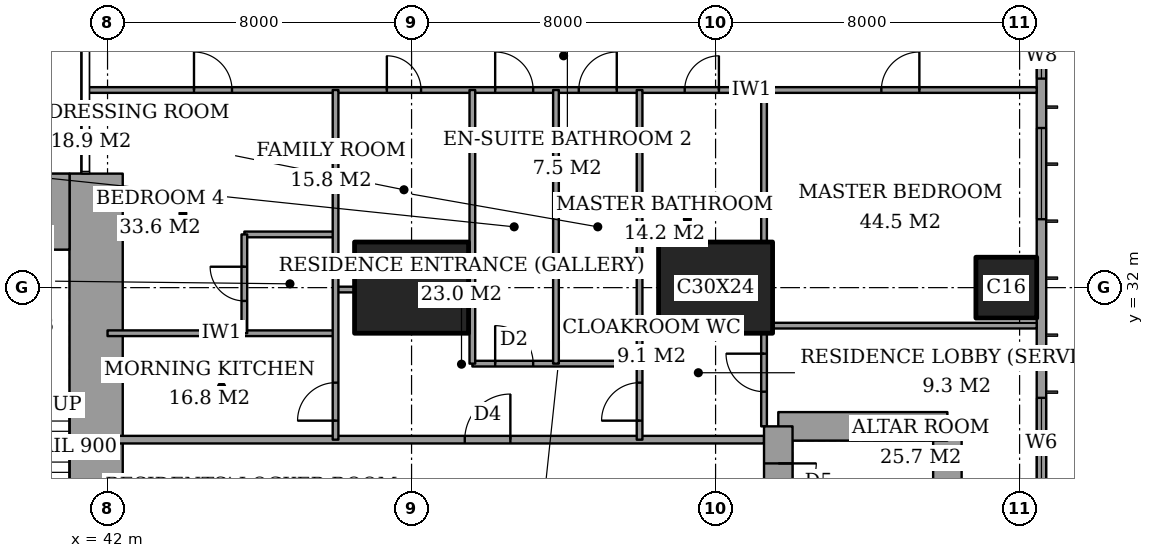
"""IFC4 building model, lengths in metres.
Left out: names, types, materials, properties, quantities, classifications, styles, units other than length and angle.
Written with IfcOpenShell. Run it as: python <this file> out.ifc"""

import sys

from ifc_helpers import new_model, si_unit, direction, frame, frame_2d, origin, origin_2d, place, context, subcontext, project, spatial, rectangle, extrude, element, fill, save


model = new_model("IFC4")
c1 = context("Model", 3, precision=1e-05, world=origin(), true_north=direction((0.0, 1.0)))
c2 = subcontext(c1, "Body", "Model", "MODEL_VIEW")
j1 = project(units=[si_unit("LENGTHUNIT", "METRE"), si_unit("PLANEANGLEUNIT", "RADIAN")], contexts=[c1])
p1 = place(None, origin())
s1 = spatial("IfcSite", under=j1, at=p1, CompositionType="ELEMENT")
p2 = place(p1, origin())
s2 = spatial("IfcBuilding", under=s1, at=p2, CompositionType="ELEMENT")
p3 = place(p2, frame((0.0, 0.0, 241.2)))
s3 = spatial("IfcBuildingStorey", under=s2, at=p3, CompositionType="ELEMENT", Elevation=241.2)
for number, where, z_axis, x_axis in (
    (1, (50.0, 32.0, 0.0), (0.0, 0.0, 1.0), (1.0, 0.0, 0.0)),
    (2, (58.0, 32.0, 0.0), (0.0, 0.0, 1.0), (1.0, 0.0, 0.0)),
):
    element("IfcColumn", number, at=place(p3, frame(where, z_axis=z_axis, x_axis=x_axis)), inside=s3, PredefinedType="COLUMN", context=c2, shape_type="SweptSolid", body=[
        extrude(rectangle(XDim=3.0, YDim=2.4, at=origin_2d()), origin(), (0.0, 0.0, 1.0), 3.6),
    ])
p4 = place(p3, frame((65.65, 32.0, 0.0), z_axis=(0.0, 0.0, 1.0), x_axis=(1.0, 0.0, 0.0)))
e3 = element("IfcColumn", 3, at=p4, inside=s3, PredefinedType="COLUMN", context=c2, shape_type="SweptSolid", body=[
    extrude(rectangle(XDim=1.6, YDim=1.6, at=origin_2d()), origin(), (0.0, 0.0, 1.0), 3.6),
])
p5 = place(p3, frame((37.85, 34.0, 0.0), z_axis=(0.0, 0.0, 1.0), x_axis=(1.0, 0.0, 0.0)))
e4 = element("IfcWall", 4, at=p5, inside=s3, PredefinedType="SHEAR", context=c2, shape_type="SweptSolid", body=[
    extrude(rectangle(XDim=3.15, YDim=2.0, at=frame_2d((1.575, 0.0))), origin(), (0.0, 0.0, 1.0), 3.6),
])
p6 = place(p3, frame((41.7, 24.85, 0.0), z_axis=(0.0, 0.0, 1.0), x_axis=(0.0, 1.0, 0.0)))
e5 = element("IfcWall", 5, at=p6, inside=s3, PredefinedType="SHEAR", context=c2, shape_type="SweptSolid", body=[
    extrude(rectangle(XDim=10.15, YDim=1.4, at=frame_2d((5.075, 0.0))), origin(), (0.0, 0.0, 1.0), 3.6),
])
p7 = place(p3, frame((64.1, 19.65, 0.0), z_axis=(0.0, 0.0, 1.0), x_axis=(0.0, 1.0, 0.0)))
e6 = element("IfcWall", 6, at=p7, inside=s3, PredefinedType="SHEAR", context=c2, shape_type="SweptSolid", body=[
    extrude(rectangle(XDim=8.7, YDim=0.75, at=frame_2d((4.35, 0.0))), origin(), (0.0, 0.0, 1.0), 3.6),
])
p8 = place(p3, frame((64.1, 28.35, 0.0), z_axis=(0.0, 0.0, 1.0), x_axis=(-1.0, 0.0, 0.0)))
e7 = element("IfcWall", 7, at=p8, inside=s3, PredefinedType="SHEAR", context=c2, shape_type="SweptSolid", body=[
    extrude(rectangle(XDim=4.45, YDim=0.75, at=frame_2d((2.225, 0.0))), origin(), (0.0, 0.0, 1.0), 3.6),
])
p9 = place(p3, frame((59.65, 28.35, 0.0), z_axis=(0.0, 0.0, 1.0), x_axis=(0.0, -1.0, 0.0)))
e8 = element("IfcWall", 8, at=p9, inside=s3, PredefinedType="SHEAR", context=c2, shape_type="SweptSolid", body=[
    extrude(rectangle(XDim=8.7, YDim=0.75, at=frame_2d((4.35, 0.0))), origin(), (0.0, 0.0, 1.0), 3.6),
])
p10 = place(p9, frame((0.975, 0.0, 0.0)))
e9 = element("IfcOpeningElement", 9, at=p10, cuts=e8, PredefinedType="OPENING", context=c2, shape_type="SweptSolid", body=[
    extrude(rectangle(XDim=1.0, YDim=2.1, at=frame_2d((0.5, 1.05))), frame((0.0, 0.385, 0.0), z_axis=(0.0, -1.0, 0.0), x_axis=(1.0, 0.0, 0.0)), (0.0, 0.0, 1.0), 0.77),
])
p11 = place(p3, frame((66.575, 3.175, 0.0), z_axis=(0.0, 0.0, 1.0), x_axis=(0.0, 1.0, 0.0)))
e10 = element("IfcWall", 10, at=p11, inside=s3, PredefinedType="SOLIDWALL", context=c2, shape_type="SweptSolid", body=[
    extrude(rectangle(XDim=41.65, YDim=0.25, at=frame_2d((20.825, 0.0))), origin(), (0.0, 0.0, 1.0), 3.6),
])
p12 = place(p11, frame((0.875, 0.0, 0.6)))
e11 = element("IfcOpeningElement", 11, at=p12, cuts=e10, PredefinedType="OPENING", context=c2, shape_type="SweptSolid", body=[
    extrude(rectangle(XDim=2.4, YDim=2.0, at=frame_2d((1.2, 1.0))), frame((0.0, 0.135, 0.0), z_axis=(0.0, -1.0, 0.0), x_axis=(1.0, 0.0, 0.0)), (0.0, 0.0, 1.0), 0.27),
])
p13 = place(p11, frame((6.0, 0.0, 0.6)))
e12 = element("IfcOpeningElement", 12, at=p13, cuts=e10, PredefinedType="OPENING", context=c2, shape_type="SweptSolid", body=[
    extrude(rectangle(XDim=1.2, YDim=2.0, at=frame_2d((0.6, 1.0))), frame((0.0, 0.135, 0.0), z_axis=(0.0, -1.0, 0.0), x_axis=(1.0, 0.0, 0.0)), (0.0, 0.0, 1.0), 0.27),
])
p14 = place(p11, frame((8.525, 0.0, 0.6)))
e13 = element("IfcOpeningElement", 13, at=p14, cuts=e10, PredefinedType="OPENING", context=c2, shape_type="SweptSolid", body=[
    extrude(rectangle(XDim=2.4, YDim=2.0, at=frame_2d((1.2, 1.0))), frame((0.0, 0.135, 0.0), z_axis=(0.0, -1.0, 0.0), x_axis=(1.0, 0.0, 0.0)), (0.0, 0.0, 1.0), 0.27),
])
p15 = place(p11, frame((15.725, 0.0, 0.6)))
e14 = element("IfcOpeningElement", 14, at=p15, cuts=e10, PredefinedType="OPENING", context=c2, shape_type="SweptSolid", body=[
    extrude(rectangle(XDim=2.4, YDim=2.0, at=frame_2d((1.2, 1.0))), frame((0.0, 0.135, 0.0), z_axis=(0.0, -1.0, 0.0), x_axis=(1.0, 0.0, 0.0)), (0.0, 0.0, 1.0), 0.27),
])
p16 = place(p11, frame((23.525, 0.0, 0.6)))
e15 = element("IfcOpeningElement", 15, at=p16, cuts=e10, PredefinedType="OPENING", context=c2, shape_type="SweptSolid", body=[
    extrude(rectangle(XDim=2.4, YDim=2.0, at=frame_2d((1.2, 1.0))), frame((0.0, 0.135, 0.0), z_axis=(0.0, -1.0, 0.0), x_axis=(1.0, 0.0, 0.0)), (0.0, 0.0, 1.0), 0.27),
])
p17 = place(p11, frame((30.625, 0.0, 0.6)))
e16 = element("IfcOpeningElement", 16, at=p17, cuts=e10, PredefinedType="OPENING", context=c2, shape_type="SweptSolid", body=[
    extrude(rectangle(XDim=2.4, YDim=2.0, at=frame_2d((1.2, 1.0))), frame((0.0, 0.135, 0.0), z_axis=(0.0, -1.0, 0.0), x_axis=(1.0, 0.0, 0.0)), (0.0, 0.0, 1.0), 0.27),
])
p18 = place(p11, frame((34.325, 0.0, 0.6)))
e17 = element("IfcOpeningElement", 17, at=p18, cuts=e10, PredefinedType="OPENING", context=c2, shape_type="SweptSolid", body=[
    extrude(rectangle(XDim=1.2, YDim=2.0, at=frame_2d((0.6, 1.0))), frame((0.0, 0.135, 0.0), z_axis=(0.0, -1.0, 0.0), x_axis=(1.0, 0.0, 0.0)), (0.0, 0.0, 1.0), 0.27),
])
p19 = place(p11, frame((38.375, 0.0, 0.6)))
e18 = element("IfcOpeningElement", 18, at=p19, cuts=e10, PredefinedType="OPENING", context=c2, shape_type="SweptSolid", body=[
    extrude(rectangle(XDim=2.4, YDim=2.0, at=frame_2d((1.2, 1.0))), frame((0.0, 0.135, 0.0), z_axis=(0.0, -1.0, 0.0), x_axis=(1.0, 0.0, 0.0)), (0.0, 0.0, 1.0), 0.27),
])
p20 = place(p3, frame((42.0, 28.0, 0.0), z_axis=(0.0, 0.0, 1.0), x_axis=(1.0, 0.0, 0.0)))
e19 = element("IfcWall", 19, at=p20, inside=s3, PredefinedType="PARTITIONING", context=c2, shape_type="SweptSolid", body=[
    extrude(rectangle(XDim=17.275, YDim=0.2, at=frame_2d((8.637, 0.0))), origin(), (0.0, 0.0, 1.0), 3.35),
])
p21 = place(p20, frame((9.4, 0.0, 0.0)))
e20 = element("IfcOpeningElement", 20, at=p21, cuts=e19, PredefinedType="OPENING", context=c2, shape_type="SweptSolid", body=[
    extrude(rectangle(XDim=1.2, YDim=2.4, at=frame_2d((0.6, 1.2))), frame((0.0, 0.11, 0.0), z_axis=(0.0, -1.0, 0.0), x_axis=(1.0, 0.0, 0.0)), (0.0, 0.0, 1.0), 0.22),
])
p22 = place(p3, frame((51.6, 30.0, 0.0), z_axis=(0.0, 0.0, 1.0), x_axis=(1.0, 0.0, 0.0)))
e21 = element("IfcWall", 21, at=p22, inside=s3, PredefinedType="PARTITIONING", context=c2, shape_type="SweptSolid", body=[
    extrude(rectangle(XDim=4.4, YDim=0.15, at=frame_2d((2.2, 0.0))), origin(), (0.0, 0.0, 1.0), 3.35),
])
p23 = place(p22, frame((0.6, 0.0, 0.0)))
e22 = element("IfcOpeningElement", 22, at=p23, cuts=e21, PredefinedType="OPENING", context=c2, shape_type="SweptSolid", body=[
    extrude(rectangle(XDim=1.0, YDim=2.1, at=frame_2d((0.5, 1.05))), frame((0.0, 0.085, 0.0), z_axis=(0.0, -1.0, 0.0), x_axis=(1.0, 0.0, 0.0)), (0.0, 0.0, 1.0), 0.17),
])
p24 = place(p3, frame((42.0, 30.8, 0.0), z_axis=(0.0, 0.0, 1.0), x_axis=(1.0, 0.0, 0.0)))
e23 = element("IfcWall", 23, at=p24, inside=s3, PredefinedType="PARTITIONING", context=c2, shape_type="SweptSolid", body=[
    extrude(rectangle(XDim=6.0, YDim=0.15, at=frame_2d((3.0, 0.0))), origin(), (0.0, 0.0, 1.0), 3.35),
])
p25 = place(p3, frame((56.0, 31.0, 0.0), z_axis=(0.0, 0.0, 1.0), x_axis=(1.0, 0.0, 0.0)))
e24 = element("IfcWall", 24, at=p25, inside=s3, PredefinedType="PARTITIONING", context=c2, shape_type="SweptSolid", body=[
    extrude(rectangle(XDim=0.5, YDim=0.15, at=frame_2d((0.25, 0.0))), origin(), (0.0, 0.0, 1.0), 3.35),
])
p26 = place(p3, frame((59.5, 31.0, 0.0), z_axis=(0.0, 0.0, 1.0), x_axis=(1.0, 0.0, 0.0)))
e25 = element("IfcWall", 25, at=p26, inside=s3, PredefinedType="PARTITIONING", context=c2, shape_type="SweptSolid", body=[
    extrude(rectangle(XDim=6.95, YDim=0.15, at=frame_2d((3.475, 0.0))), origin(), (0.0, 0.0, 1.0), 3.35),
])
p27 = place(p3, frame((48.0, 31.95, 0.0), z_axis=(0.0, 0.0, 1.0), x_axis=(1.0, 0.0, 0.0)))
e26 = element("IfcWall", 26, at=p27, inside=s3, PredefinedType="PARTITIONING", context=c2, shape_type="SweptSolid", body=[
    extrude(rectangle(XDim=0.5, YDim=0.15, at=frame_2d((0.25, 0.0))), origin(), (0.0, 0.0, 1.0), 2.634),
])
p28 = place(p3, frame((45.6, 33.4, 0.0), z_axis=(0.0, 0.0, 1.0), x_axis=(1.0, 0.0, 0.0)))
e27 = element("IfcWall", 27, at=p28, inside=s3, PredefinedType="PARTITIONING", context=c2, shape_type="SweptSolid", body=[
    extrude(rectangle(XDim=2.4, YDim=0.15, at=frame_2d((1.2, 0.0))), origin(), (0.0, 0.0, 1.0), 3.35),
])
p29 = place(p3, frame((41.439, 37.2, 0.0), z_axis=(0.0, 0.0, 1.0), x_axis=(1.0, 0.0, 0.0)))
e28 = element("IfcWall", 28, at=p29, inside=s3, PredefinedType="PARTITIONING", context=c2, shape_type="SweptSolid", body=[
    extrude(rectangle(XDim=25.011, YDim=0.15, at=frame_2d((12.505, 0.0))), origin(), (0.0, 0.0, 1.0), 3.35),
])
p30 = place(p29, frame((10.761, 0.0, 0.0)))
e29 = element("IfcOpeningElement", 29, at=p30, cuts=e28, PredefinedType="OPENING", context=c2, shape_type="SweptSolid", body=[
    extrude(rectangle(XDim=1.0, YDim=2.1, at=frame_2d((0.5, 1.05))), frame((0.0, 0.085, 0.0), z_axis=(0.0, -1.0, 0.0), x_axis=(1.0, 0.0, 0.0)), (0.0, 0.0, 1.0), 0.17),
])
p31 = place(p29, frame((20.924, 0.0, 0.0)))
e30 = element("IfcOpeningElement", 30, at=p31, cuts=e28, PredefinedType="OPENING", context=c2, shape_type="SweptSolid", body=[
    extrude(rectangle(XDim=1.0, YDim=2.1, at=frame_2d((0.5, 1.05))), frame((0.0, 0.085, 0.0), z_axis=(0.0, -1.0, 0.0), x_axis=(1.0, 0.0, 0.0)), (0.0, 0.0, 1.0), 0.17),
])
p32 = place(p29, frame((15.749, 0.0, 0.0)))
e31 = element("IfcOpeningElement", 31, at=p32, cuts=e28, PredefinedType="OPENING", context=c2, shape_type="SweptSolid", body=[
    extrude(rectangle(XDim=0.9, YDim=2.1, at=frame_2d((0.45, 1.05))), frame((0.0, 0.085, 0.0), z_axis=(0.0, -1.0, 0.0), x_axis=(1.0, 0.0, 0.0)), (0.0, 0.0, 1.0), 0.17),
])
p33 = place(p29, frame((12.961, 0.0, 0.0)))
e32 = element("IfcOpeningElement", 32, at=p33, cuts=e28, PredefinedType="OPENING", context=c2, shape_type="SweptSolid", body=[
    extrude(rectangle(XDim=1.0, YDim=2.1, at=frame_2d((0.5, 1.05))), frame((0.0, 0.085, 0.0), z_axis=(0.0, -1.0, 0.0), x_axis=(1.0, 0.0, 0.0)), (0.0, 0.0, 1.0), 0.17),
])
p34 = place(p29, frame((7.911, 0.0, 0.0)))
e33 = element("IfcOpeningElement", 33, at=p34, cuts=e28, PredefinedType="OPENING", context=c2, shape_type="SweptSolid", body=[
    extrude(rectangle(XDim=0.9, YDim=2.1, at=frame_2d((0.45, 1.05))), frame((0.0, 0.085, 0.0), z_axis=(0.0, -1.0, 0.0), x_axis=(1.0, 0.0, 0.0)), (0.0, 0.0, 1.0), 0.17),
])
p35 = place(p29, frame((2.836, 0.0, 0.0)))
e34 = element("IfcOpeningElement", 34, at=p35, cuts=e28, PredefinedType="OPENING", context=c2, shape_type="SweptSolid", body=[
    extrude(rectangle(XDim=1.0, YDim=2.1, at=frame_2d((0.5, 1.05))), frame((0.0, 0.085, 0.0), z_axis=(0.0, -1.0, 0.0), x_axis=(1.0, 0.0, 0.0)), (0.0, 0.0, 1.0), 0.17),
])
p36 = place(p3, frame((45.6, 30.8, 0.0), z_axis=(0.0, 0.0, 1.0), x_axis=(0.0, 1.0, 0.0)))
e35 = element("IfcWall", 35, at=p36, inside=s3, PredefinedType="PARTITIONING", context=c2, shape_type="SweptSolid", body=[
    extrude(rectangle(XDim=2.6, YDim=0.15, at=frame_2d((1.3, 0.0))), origin(), (0.0, 0.0, 1.0), 3.35),
])
p37 = place(p36, frame((0.85, 0.0, 0.0)))
e36 = element("IfcOpeningElement", 36, at=p37, cuts=e35, PredefinedType="OPENING", context=c2, shape_type="SweptSolid", body=[
    extrude(rectangle(XDim=0.9, YDim=2.1, at=frame_2d((0.45, 1.05))), frame((0.0, 0.085, 0.0), z_axis=(0.0, -1.0, 0.0), x_axis=(1.0, 0.0, 0.0)), (0.0, 0.0, 1.0), 0.17),
])
p38 = place(p3, frame((48.0, 28.0, 0.0), z_axis=(0.0, 0.0, 1.0), x_axis=(0.0, 1.0, 0.0)))
e37 = element("IfcWall", 37, at=p38, inside=s3, PredefinedType="PARTITIONING", context=c2, shape_type="SweptSolid", body=[
    extrude(rectangle(XDim=9.2, YDim=0.15, at=frame_2d((4.6, 0.0))), origin(), (0.0, 0.0, 1.0), 3.35),
])
p39 = place(p38, frame((0.5, 0.0, 0.0)))
e38 = element("IfcOpeningElement", 38, at=p39, cuts=e37, PredefinedType="OPENING", context=c2, shape_type="SweptSolid", body=[
    extrude(rectangle(XDim=1.0, YDim=2.1, at=frame_2d((0.5, 1.05))), frame((0.0, 0.085, 0.0), z_axis=(0.0, -1.0, 0.0), x_axis=(1.0, 0.0, 0.0)), (0.0, 0.0, 1.0), 0.17),
])
for number, where, z_axis, x_axis in (
    (39, (51.6, 30.0, 0.0), (0.0, 0.0, 1.0), (0.0, 1.0, 0.0)),
    (40, (53.8, 30.0, 0.0), (0.0, 0.0, 1.0), (0.0, 1.0, 0.0)),
):
    element("IfcWall", number, at=place(p3, frame(where, z_axis=z_axis, x_axis=x_axis)), inside=s3, PredefinedType="PARTITIONING", context=c2, shape_type="SweptSolid", body=[
        extrude(rectangle(XDim=7.2, YDim=0.15, at=frame_2d((3.6, 0.0))), origin(), (0.0, 0.0, 1.0), 3.35),
    ])
p40 = place(p3, frame((56.0, 28.0, 0.0), z_axis=(0.0, 0.0, 1.0), x_axis=(0.0, 1.0, 0.0)))
e41 = element("IfcWall", 41, at=p40, inside=s3, PredefinedType="PARTITIONING", context=c2, shape_type="SweptSolid", body=[
    extrude(rectangle(XDim=9.2, YDim=0.15, at=frame_2d((4.6, 0.0))), origin(), (0.0, 0.0, 1.0), 3.35),
])
p41 = place(p40, frame((0.5, 0.0, 0.0)))
e42 = element("IfcOpeningElement", 42, at=p41, cuts=e41, PredefinedType="OPENING", context=c2, shape_type="SweptSolid", body=[
    extrude(rectangle(XDim=1.0, YDim=2.1, at=frame_2d((0.5, 1.05))), frame((0.0, 0.085, 0.0), z_axis=(0.0, -1.0, 0.0), x_axis=(1.0, 0.0, 0.0)), (0.0, 0.0, 1.0), 0.17),
])
p42 = place(p3, frame((59.275, 28.35, 0.0), z_axis=(0.0, 0.0, 1.0), x_axis=(0.0, 1.0, 0.0)))
e43 = element("IfcWall", 43, at=p42, inside=s3, PredefinedType="PARTITIONING", context=c2, shape_type="SweptSolid", body=[
    extrude(rectangle(XDim=2.45, YDim=0.15, at=frame_2d((1.225, 0.0))), origin(), (0.0, 0.0, 1.0), 3.35),
])
p43 = place(p42, frame((0.913, 0.0, 0.0)))
e44 = element("IfcOpeningElement", 44, at=p43, cuts=e43, PredefinedType="OPENING", context=c2, shape_type="SweptSolid", body=[
    extrude(rectangle(XDim=1.0, YDim=2.1, at=frame_2d((0.5, 1.05))), frame((0.0, 0.085, 0.0), z_axis=(0.0, -1.0, 0.0), x_axis=(1.0, 0.0, 0.0)), (0.0, 0.0, 1.0), 0.17),
])
p44 = place(p3, frame((59.275, 33.2, 0.0), z_axis=(0.0, 0.0, 1.0), x_axis=(0.0, 1.0, 0.0)))
e45 = element("IfcWall", 45, at=p44, inside=s3, PredefinedType="PARTITIONING", context=c2, shape_type="SweptSolid", body=[
    extrude(rectangle(XDim=4.0, YDim=0.15, at=frame_2d((2.0, 0.0))), origin(), (0.0, 0.0, 1.0), 3.35),
])
p45 = place(p16, origin())
e46 = element("IfcWindow", 46, at=p45, inside=s3, PartitioningType="SINGLE_PANEL", PredefinedType="WINDOW", context=c2, shape_type="SweptSolid", body=[
    extrude(rectangle(XDim=2.4, YDim=2.0, at=frame_2d((1.2, 1.0))), frame((0.0, 0.03, 0.0), z_axis=(0.0, -1.0, 0.0), x_axis=(1.0, 0.0, 0.0)), (0.0, 0.0, 1.0), 0.06),
])
fill(e15, e46)
p46 = place(p17, origin())
e47 = element("IfcWindow", 47, at=p46, inside=s3, PartitioningType="SINGLE_PANEL", PredefinedType="WINDOW", context=c2, shape_type="SweptSolid", body=[
    extrude(rectangle(XDim=2.4, YDim=2.0, at=frame_2d((1.2, 1.0))), frame((0.0, 0.03, 0.0), z_axis=(0.0, -1.0, 0.0), x_axis=(1.0, 0.0, 0.0)), (0.0, 0.0, 1.0), 0.06),
])
fill(e16, e47)
p47 = place(p18, origin())
e48 = element("IfcWindow", 48, at=p47, inside=s3, PartitioningType="SINGLE_PANEL", PredefinedType="WINDOW", context=c2, shape_type="SweptSolid", body=[
    extrude(rectangle(XDim=1.2, YDim=2.0, at=frame_2d((0.6, 1.0))), frame((0.0, 0.03, 0.0), z_axis=(0.0, -1.0, 0.0), x_axis=(1.0, 0.0, 0.0)), (0.0, 0.0, 1.0), 0.06),
])
fill(e17, e48)
p48 = place(p30, origin())
e49 = element("IfcDoor", 49, at=p48, inside=s3, OperationType="SINGLE_SWING_RIGHT", PredefinedType="DOOR", context=c2, shape_type="SweptSolid", body=[
    extrude(rectangle(XDim=1.0, YDim=2.1, at=frame_2d((0.5, 1.05))), frame((0.0, 0.025, 0.0), z_axis=(0.0, -1.0, 0.0), x_axis=(1.0, 0.0, 0.0)), (0.0, 0.0, 1.0), 0.05),
])
fill(e29, e49)
p49 = place(p31, origin())
e50 = element("IfcDoor", 50, at=p49, inside=s3, OperationType="SINGLE_SWING_LEFT", PredefinedType="DOOR", context=c2, shape_type="SweptSolid", body=[
    extrude(rectangle(XDim=1.0, YDim=2.1, at=frame_2d((0.5, 1.05))), frame((0.0, 0.025, 0.0), z_axis=(0.0, -1.0, 0.0), x_axis=(1.0, 0.0, 0.0)), (0.0, 0.0, 1.0), 0.05),
])
fill(e30, e50)
p50 = place(p43, origin())
e51 = element("IfcDoor", 51, at=p50, inside=s3, OperationType="SINGLE_SWING_LEFT", PredefinedType="DOOR", context=c2, shape_type="SweptSolid", body=[
    extrude(rectangle(XDim=1.0, YDim=2.1, at=frame_2d((0.5, 1.05))), frame((0.0, 0.025, 0.0), z_axis=(0.0, -1.0, 0.0), x_axis=(1.0, 0.0, 0.0)), (0.0, 0.0, 1.0), 0.05),
])
fill(e44, e51)
p51 = place(p32, origin())
e52 = element("IfcDoor", 52, at=p51, inside=s3, OperationType="SINGLE_SWING_LEFT", PredefinedType="DOOR", context=c2, shape_type="SweptSolid", body=[
    extrude(rectangle(XDim=0.9, YDim=2.1, at=frame_2d((0.45, 1.05))), frame((0.0, 0.025, 0.0), z_axis=(0.0, -1.0, 0.0), x_axis=(1.0, 0.0, 0.0)), (0.0, 0.0, 1.0), 0.05),
])
fill(e31, e52)
p52 = place(p41, origin())
e53 = element("IfcDoor", 53, at=p52, inside=s3, OperationType="SINGLE_SWING_RIGHT", PredefinedType="DOOR", context=c2, shape_type="SweptSolid", body=[
    extrude(rectangle(XDim=1.0, YDim=2.1, at=frame_2d((0.5, 1.05))), frame((0.0, 0.025, 0.0), z_axis=(0.0, -1.0, 0.0), x_axis=(1.0, 0.0, 0.0)), (0.0, 0.0, 1.0), 0.05),
])
fill(e42, e53)
p53 = place(p21, origin())
e54 = element("IfcDoor", 54, at=p53, inside=s3, OperationType="SINGLE_SWING_LEFT", PredefinedType="DOOR", context=c2, shape_type="SweptSolid", body=[
    extrude(rectangle(XDim=1.2, YDim=2.4, at=frame_2d((0.6, 1.2))), frame((0.0, 0.025, 0.0), z_axis=(0.0, -1.0, 0.0), x_axis=(1.0, 0.0, 0.0)), (0.0, 0.0, 1.0), 0.05),
])
fill(e20, e54)
p54 = place(p33, origin())
e55 = element("IfcDoor", 55, at=p54, inside=s3, OperationType="SINGLE_SWING_LEFT", PredefinedType="DOOR", context=c2, shape_type="SweptSolid", body=[
    extrude(rectangle(XDim=1.0, YDim=2.1, at=frame_2d((0.5, 1.05))), frame((0.0, 0.025, 0.0), z_axis=(0.0, -1.0, 0.0), x_axis=(1.0, 0.0, 0.0)), (0.0, 0.0, 1.0), 0.05),
])
fill(e32, e55)
p55 = place(p23, origin())
e56 = element("IfcDoor", 56, at=p55, inside=s3, OperationType="SINGLE_SWING_RIGHT", PredefinedType="DOOR", context=c2, shape_type="SweptSolid", body=[
    extrude(rectangle(XDim=1.0, YDim=2.1, at=frame_2d((0.5, 1.05))), frame((0.0, 0.025, 0.0), z_axis=(0.0, -1.0, 0.0), x_axis=(1.0, 0.0, 0.0)), (0.0, 0.0, 1.0), 0.05),
])
fill(e22, e56)
p56 = place(p34, origin())
e57 = element("IfcDoor", 57, at=p56, inside=s3, OperationType="SINGLE_SWING_RIGHT", PredefinedType="DOOR", context=c2, shape_type="SweptSolid", body=[
    extrude(rectangle(XDim=0.9, YDim=2.1, at=frame_2d((0.45, 1.05))), frame((0.0, 0.025, 0.0), z_axis=(0.0, -1.0, 0.0), x_axis=(1.0, 0.0, 0.0)), (0.0, 0.0, 1.0), 0.05),
])
fill(e33, e57)
p57 = place(p37, origin())
e58 = element("IfcDoor", 58, at=p57, inside=s3, OperationType="SINGLE_SWING_LEFT", PredefinedType="DOOR", context=c2, shape_type="SweptSolid", body=[
    extrude(rectangle(XDim=0.9, YDim=2.1, at=frame_2d((0.45, 1.05))), frame((0.0, 0.025, 0.0), z_axis=(0.0, -1.0, 0.0), x_axis=(1.0, 0.0, 0.0)), (0.0, 0.0, 1.0), 0.05),
])
fill(e36, e58)
p58 = place(p35, origin())
e59 = element("IfcDoor", 59, at=p58, inside=s3, OperationType="SINGLE_SWING_RIGHT", PredefinedType="DOOR", context=c2, shape_type="SweptSolid", body=[
    extrude(rectangle(XDim=1.0, YDim=2.1, at=frame_2d((0.5, 1.05))), frame((0.0, 0.025, 0.0), z_axis=(0.0, -1.0, 0.0), x_axis=(1.0, 0.0, 0.0)), (0.0, 0.0, 1.0), 0.05),
])
fill(e34, e59)
p59 = place(p39, origin())
e60 = element("IfcDoor", 60, at=p59, inside=s3, OperationType="SINGLE_SWING_RIGHT", PredefinedType="DOOR", context=c2, shape_type="SweptSolid", body=[
    extrude(rectangle(XDim=1.0, YDim=2.1, at=frame_2d((0.5, 1.05))), frame((0.0, 0.025, 0.0), z_axis=(0.0, -1.0, 0.0), x_axis=(1.0, 0.0, 0.0)), (0.0, 0.0, 1.0), 0.05),
])
fill(e38, e60)
p60 = place(p10, origin())
e61 = element("IfcDoor", 61, at=p60, inside=s3, OperationType="SINGLE_SWING_RIGHT", PredefinedType="DOOR", context=c2, shape_type="SweptSolid", body=[
    extrude(rectangle(XDim=1.0, YDim=2.1, at=frame_2d((0.5, 1.05))), frame((0.0, 0.025, 0.0), z_axis=(0.0, -1.0, 0.0), x_axis=(1.0, 0.0, 0.0)), (0.0, 0.0, 1.0), 0.05),
])
fill(e9, e61)
save(model, sys.argv[1])
